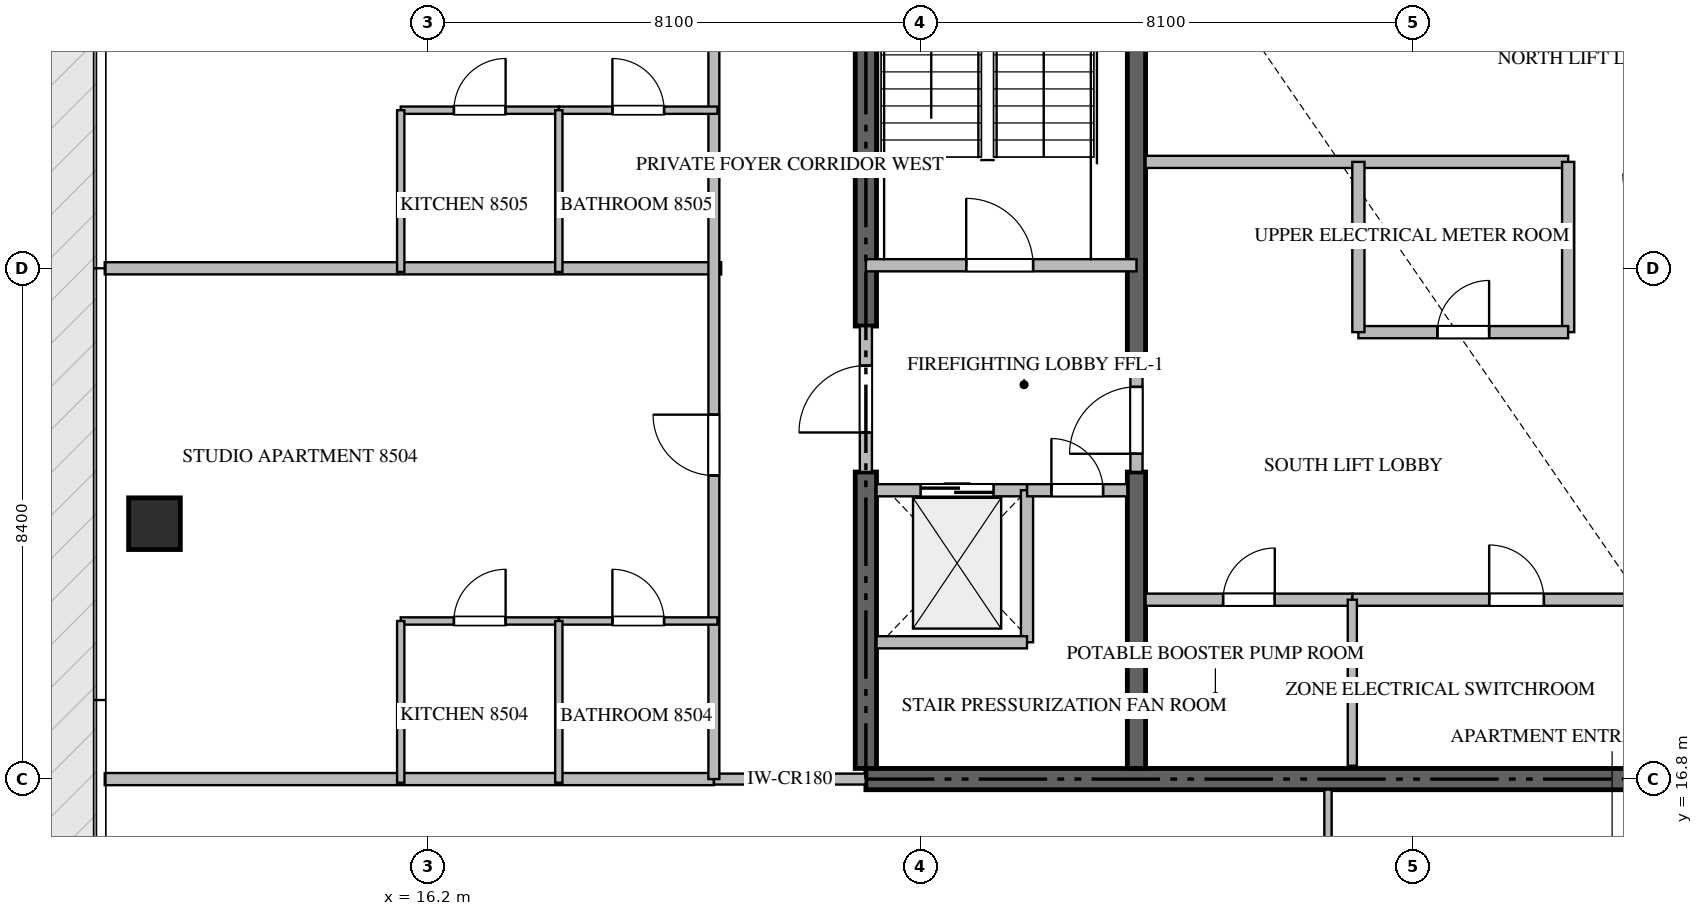
"""IFC4 building model, lengths in metres.
Left out: names, types, materials, properties, quantities, classifications, styles, units other than length and angle.
Written with IfcOpenShell. Run it as: python <this file> out.ifc"""

import sys

from ifc_helpers import new_model, si_unit, direction, frame, frame_2d, origin, origin_2d, place, context, subcontext, project, spatial, rectangle, extrude, source, transform, mapped, element, fill, save


model = new_model("IFC4")
c1 = context("Model", 3, precision=1e-05, world=origin(), true_north=direction((0.0, 1.0)))
c2 = subcontext(c1, "Body", "Model", "MODEL_VIEW")
j1 = project(units=[si_unit("LENGTHUNIT", "METRE"), si_unit("PLANEANGLEUNIT", "RADIAN")], contexts=[c1])
p1 = place(None, origin())
s1 = spatial("IfcSite", under=j1, at=p1, CompositionType="ELEMENT")
p2 = place(p1, origin())
s2 = spatial("IfcBuilding", under=s1, at=p2, CompositionType="ELEMENT")
p3 = place(p2, frame((0.0, 0.0, 342.05)))
s3 = spatial("IfcBuildingStorey", under=s2, at=p3, CompositionType="ELEMENT", Elevation=342.05)
p4 = place(p3, frame((23.4, 16.8, -0.26), z_axis=(0.0, 0.0, 1.0), x_axis=(1.0, 0.0, 0.0)))
e1 = element("IfcWall", 1, at=p4, inside=s3, PredefinedType="SHEAR", context=c2, shape_type="SweptSolid", body=[
    extrude(rectangle(XDim=18.0, YDim=0.35, at=frame_2d((9.0, 0.0))), origin(), (0.0, 0.0, 1.0), 5.898),
])
p5 = place(p3, frame((23.4, 16.975, -0.26), z_axis=(0.0, 0.0, 1.0), x_axis=(0.0, 1.0, 0.0)))
e2 = element("IfcWall", 2, at=p5, inside=s3, PredefinedType="SHEAR", context=c2, shape_type="SweptSolid", body=[
    extrude(rectangle(XDim=4.875, YDim=0.35, at=frame_2d((2.438, 0.0))), origin(), (0.0, 0.0, 1.0), 5.898),
])
p6 = place(p3, frame((23.4, 24.25, -0.26), z_axis=(0.0, 0.0, 1.0), x_axis=(0.0, 1.0, 0.0)))
e3 = element("IfcWall", 3, at=p6, inside=s3, PredefinedType="SHEAR", context=c2, shape_type="SweptSolid", body=[
    extrude(rectangle(XDim=9.175, YDim=0.35, at=frame_2d((4.587, 0.0))), origin(), (0.0, 0.0, 1.0), 5.898),
])
p7 = place(p3, frame((27.85, 16.975, -0.26), z_axis=(0.0, 0.0, 1.0), x_axis=(0.0, 1.0, 0.0)))
e4 = element("IfcWall", 4, at=p7, inside=s3, PredefinedType="SHEAR", context=c2, shape_type="SweptSolid", body=[
    extrude(rectangle(XDim=4.875, YDim=0.3, at=frame_2d((2.438, 0.0))), origin(), (0.0, 0.0, 1.0), 5.898),
])
p8 = place(p3, frame((27.85, 23.55, -0.26), z_axis=(0.0, 0.0, 1.0), x_axis=(0.0, 1.0, 0.0)))
e5 = element("IfcWall", 5, at=p8, inside=s3, PredefinedType="SHEAR", context=c2, shape_type="SweptSolid", body=[
    extrude(rectangle(XDim=9.875, YDim=0.3, at=frame_2d((4.938, 0.0))), origin(), (0.0, 0.0, 1.0), 5.898),
])
m1 = source(origin(), c2, "Body", "SweptSolid", [
    extrude(rectangle(XDim=0.85, YDim=0.85, at=origin_2d()), origin(), (0.0, 0.0, 1.0), 5.9),
])
p9 = place(p3, frame((11.7, 21.0, -0.26), z_axis=(0.0, 0.0, 1.0), x_axis=(1.0, 0.0, 0.0)))
e6 = element("IfcColumn", 6, at=p9, inside=s3, PredefinedType="COLUMN", context=c2, shape_type="MappedRepresentation", body=[
    mapped(m1, transform((0.0, 0.0, 0.0), scale=1.0)),
])
p10 = place(p3, frame((23.4, 25.25, 0.0), z_axis=(0.0, 0.0, 1.0), x_axis=(1.0, 0.0, 0.0)))
e7 = element("IfcWall", 7, at=p10, inside=s3, PredefinedType="STANDARD", context=c2, shape_type="SweptSolid", body=[
    extrude(rectangle(XDim=4.45, YDim=0.2, at=frame_2d((2.225, 0.0))), origin(), (0.0, 0.0, 1.0), 5.64),
])
p11 = place(p10, frame((1.65, 0.0, 0.0)))
e8 = element("IfcOpeningElement", 8, at=p11, cuts=e7, PredefinedType="OPENING", context=c2, shape_type="SweptSolid", body=[
    extrude(rectangle(XDim=1.1, YDim=2.15, at=frame_2d((0.55, 1.075))), frame((0.0, 0.11, 0.0), z_axis=(0.0, -1.0, 0.0), x_axis=(1.0, 0.0, 0.0)), (0.0, 0.0, 1.0), 0.22),
])
p12 = place(p3, frame((23.575, 21.55, 0.0), z_axis=(0.0, 0.0, 1.0), x_axis=(1.0, 0.0, 0.0)))
e9 = element("IfcWall", 9, at=p12, inside=s3, PredefinedType="STANDARD", context=c2, shape_type="SweptSolid", body=[
    extrude(rectangle(XDim=2.475, YDim=0.2, at=frame_2d((1.238, 0.0))), origin(), (0.0, 0.0, 1.0), 5.64),
])
p13 = place(p12, frame((0.725, 0.0, 0.0)))
e10 = element("IfcOpeningElement", 10, at=p13, cuts=e9, PredefinedType="OPENING", context=c2, shape_type="SweptSolid", body=[
    extrude(rectangle(XDim=1.2, YDim=2.2, at=frame_2d((0.6, 1.1))), frame((0.0, 0.11, 0.0), z_axis=(0.0, -1.0, 0.0), x_axis=(1.0, 0.0, 0.0)), (0.0, 0.0, 1.0), 0.22),
])
p14 = place(p3, frame((26.05, 19.05, 0.0), z_axis=(0.0, 0.0, 1.0), x_axis=(0.0, 1.0, 0.0)))
e11 = element("IfcWall", 11, at=p14, inside=s3, PredefinedType="STANDARD", context=c2, shape_type="SweptSolid", body=[
    extrude(rectangle(XDim=2.5, YDim=0.2, at=frame_2d((1.25, 0.0))), origin(), (0.0, 0.0, 1.0), 5.64),
])
p15 = place(p3, frame((23.575, 19.05, 0.0), z_axis=(0.0, 0.0, 1.0), x_axis=(1.0, 0.0, 0.0)))
e12 = element("IfcWall", 12, at=p15, inside=s3, PredefinedType="STANDARD", context=c2, shape_type="SweptSolid", body=[
    extrude(rectangle(XDim=2.475, YDim=0.2, at=frame_2d((1.238, 0.0))), origin(), (0.0, 0.0, 1.0), 5.64),
])
p16 = place(p3, frame((26.052, 21.55, 0.0), z_axis=(0.0, 0.0, 1.0), x_axis=(1.0, 0.0, 0.0)))
e13 = element("IfcWall", 13, at=p16, inside=s3, PredefinedType="STANDARD", context=c2, shape_type="SweptSolid", body=[
    extrude(rectangle(XDim=1.648, YDim=0.2, at=frame_2d((0.824, 0.0))), origin(), (0.0, 0.0, 1.0), 5.64),
])
p17 = place(p16, frame((0.399, 0.0, 0.0)))
e14 = element("IfcOpeningElement", 14, at=p17, cuts=e13, PredefinedType="OPENING", context=c2, shape_type="SweptSolid", body=[
    extrude(rectangle(XDim=0.85, YDim=2.1, at=frame_2d((0.425, 1.05))), frame((0.0, 0.11, 0.0), z_axis=(0.0, -1.0, 0.0), x_axis=(1.0, 0.0, 0.0)), (0.0, 0.0, 1.0), 0.22),
])
p18 = place(p3, frame((23.4, 21.852, 0.0), z_axis=(0.0, 0.0, 1.0), x_axis=(0.0, 1.0, 0.0)))
e15 = element("IfcWall", 15, at=p18, inside=s3, PredefinedType="STANDARD", context=c2, shape_type="SweptSolid", body=[
    extrude(rectangle(XDim=2.396, YDim=0.2, at=frame_2d((1.198, 0.0))), origin(), (0.0, 0.0, 1.0), 5.64),
])
p19 = place(p18, frame((0.648, 0.0, 0.0)))
e16 = element("IfcOpeningElement", 16, at=p19, cuts=e15, PredefinedType="OPENING", context=c2, shape_type="SweptSolid", body=[
    extrude(rectangle(XDim=1.1, YDim=2.15, at=frame_2d((0.55, 1.075))), frame((0.0, 0.11, 0.0), z_axis=(0.0, -1.0, 0.0), x_axis=(1.0, 0.0, 0.0)), (0.0, 0.0, 1.0), 0.22),
])
p20 = place(p3, frame((27.85, 21.852, 0.0), z_axis=(0.0, 0.0, 1.0), x_axis=(0.0, 1.0, 0.0)))
e17 = element("IfcWall", 17, at=p20, inside=s3, PredefinedType="STANDARD", context=c2, shape_type="SweptSolid", body=[
    extrude(rectangle(XDim=1.696, YDim=0.2, at=frame_2d((0.848, 0.0))), origin(), (0.0, 0.0, 1.0), 5.64),
])
p21 = place(p20, frame((0.298, 0.0, 0.0)))
e18 = element("IfcOpeningElement", 18, at=p21, cuts=e17, PredefinedType="OPENING", context=c2, shape_type="SweptSolid", body=[
    extrude(rectangle(XDim=1.1, YDim=2.15, at=frame_2d((0.55, 1.075))), frame((0.0, 0.11, 0.0), z_axis=(0.0, -1.0, 0.0), x_axis=(1.0, 0.0, 0.0)), (0.0, 0.0, 1.0), 0.22),
])
p22 = place(p3, frame((28.0, 19.75, 0.0), z_axis=(0.0, 0.0, 1.0), x_axis=(1.0, 0.0, 0.0)))
e19 = element("IfcWall", 19, at=p22, inside=s3, PredefinedType="STANDARD", context=c2, shape_type="SweptSolid", body=[
    extrude(rectangle(XDim=3.4, YDim=0.2, at=frame_2d((1.7, 0.0))), origin(), (0.0, 0.0, 1.0), 5.64),
])
p23 = place(p22, frame((1.275, 0.0, 0.0)))
e20 = element("IfcOpeningElement", 20, at=p23, cuts=e19, PredefinedType="OPENING", context=c2, shape_type="SweptSolid", body=[
    extrude(rectangle(XDim=0.85, YDim=2.1, at=frame_2d((0.425, 1.05))), frame((0.0, 0.11, 0.0), z_axis=(0.0, -1.0, 0.0), x_axis=(1.0, 0.0, 0.0)), (0.0, 0.0, 1.0), 0.22),
])
p24 = place(p3, frame((31.402, 19.75, 0.0), z_axis=(0.0, 0.0, 1.0), x_axis=(1.0, 0.0, 0.0)))
e21 = element("IfcWall", 21, at=p24, inside=s3, PredefinedType="STANDARD", context=c2, shape_type="SweptSolid", body=[
    extrude(rectangle(XDim=5.398, YDim=0.2, at=frame_2d((2.699, 0.0))), origin(), (0.0, 0.0, 1.0), 5.64),
])
p25 = place(p24, frame((2.249, 0.0, 0.0)))
e22 = element("IfcOpeningElement", 22, at=p25, cuts=e21, PredefinedType="OPENING", context=c2, shape_type="SweptSolid", body=[
    extrude(rectangle(XDim=0.9, YDim=2.1, at=frame_2d((0.45, 1.05))), frame((0.0, 0.11, 0.0), z_axis=(0.0, -1.0, 0.0), x_axis=(1.0, 0.0, 0.0)), (0.0, 0.0, 1.0), 0.22),
])
p26 = place(p3, frame((31.4, 17.02, 0.0), z_axis=(0.0, 0.0, 1.0), x_axis=(0.0, 1.0, 0.0)))
e23 = element("IfcWall", 23, at=p26, inside=s3, PredefinedType="PARTITIONING", context=c2, shape_type="SweptSolid", body=[
    extrude(rectangle(XDim=2.73, YDim=0.15, at=frame_2d((1.365, 0.0))), origin(), (0.0, 0.0, 1.0), 5.64),
])
p27 = place(p3, frame((28.0, 26.95, 0.0), z_axis=(0.0, 0.0, 1.0), x_axis=(1.0, 0.0, 0.0)))
e24 = element("IfcWall", 24, at=p27, inside=s3, PredefinedType="STANDARD", context=c2, shape_type="SweptSolid", body=[
    extrude(rectangle(XDim=6.95, YDim=0.2, at=frame_2d((3.475, 0.0))), origin(), (0.0, 0.0, 1.0), 5.64),
])
p28 = place(p3, frame((34.95, 24.15, 0.0), z_axis=(0.0, 0.0, 1.0), x_axis=(0.0, 1.0, 0.0)))
e25 = element("IfcWall", 25, at=p28, inside=s3, PredefinedType="STANDARD", context=c2, shape_type="SweptSolid", body=[
    extrude(rectangle(XDim=2.8, YDim=0.2, at=frame_2d((1.4, 0.0))), origin(), (0.0, 0.0, 1.0), 5.64),
])
p29 = place(p3, frame((31.5, 24.15, 0.0), z_axis=(0.0, 0.0, 1.0), x_axis=(1.0, 0.0, 0.0)))
e26 = element("IfcWall", 26, at=p29, inside=s3, PredefinedType="STANDARD", context=c2, shape_type="SweptSolid", body=[
    extrude(rectangle(XDim=3.45, YDim=0.2, at=frame_2d((1.725, 0.0))), origin(), (0.0, 0.0, 1.0), 5.64),
])
p30 = place(p29, frame((1.3, 0.0, 0.0)))
e27 = element("IfcOpeningElement", 27, at=p30, cuts=e26, PredefinedType="OPENING", context=c2, shape_type="SweptSolid", body=[
    extrude(rectangle(XDim=0.85, YDim=2.1, at=frame_2d((0.425, 1.05))), frame((0.0, 0.11, 0.0), z_axis=(0.0, -1.0, 0.0), x_axis=(1.0, 0.0, 0.0)), (0.0, 0.0, 1.0), 0.22),
])
p31 = place(p3, frame((31.5, 24.15, 0.0), z_axis=(0.0, 0.0, 1.0), x_axis=(0.0, 1.0, 0.0)))
e28 = element("IfcWall", 28, at=p31, inside=s3, PredefinedType="STANDARD", context=c2, shape_type="SweptSolid", body=[
    extrude(rectangle(XDim=2.8, YDim=0.2, at=frame_2d((1.4, 0.0))), origin(), (0.0, 0.0, 1.0), 5.64),
])
p32 = place(p3, frame((10.882, 25.2, 0.0), z_axis=(0.0, 0.0, 1.0), x_axis=(1.0, 0.0, 0.0)))
e29 = element("IfcWall", 29, at=p32, inside=s3, PredefinedType="PARTITIONING", context=c2, shape_type="SweptSolid", body=[
    extrude(rectangle(XDim=10.138, YDim=0.2, at=frame_2d((5.069, 0.0))), origin(), (0.0, 0.0, 1.0), 5.64),
])
p33 = place(p3, frame((10.882, 16.8, 0.0), z_axis=(0.0, 0.0, 1.0), x_axis=(1.0, 0.0, 0.0)))
e30 = element("IfcWall", 30, at=p33, inside=s3, PredefinedType="PARTITIONING", context=c2, shape_type="SweptSolid", body=[
    extrude(rectangle(XDim=10.018, YDim=0.2, at=frame_2d((5.009, 0.0))), origin(), (0.0, 0.0, 1.0), 5.64),
])
p34 = place(p3, frame((20.902, 16.8, 0.0), z_axis=(0.0, 0.0, 1.0), x_axis=(1.0, 0.0, 0.0)))
e31 = element("IfcWall", 31, at=p34, inside=s3, PredefinedType="PARTITIONING", context=c2, shape_type="SweptSolid", body=[
    extrude(rectangle(XDim=2.496, YDim=0.18, at=frame_2d((1.248, 0.0))), origin(), (0.0, 0.0, 1.0), 5.64),
])
p35 = place(p3, frame((20.9, 16.8, 0.0), z_axis=(0.0, 0.0, 1.0), x_axis=(0.0, 1.0, 0.0)))
e32 = element("IfcWall", 32, at=p35, inside=s3, PredefinedType="PARTITIONING", context=c2, shape_type="SweptSolid", body=[
    extrude(rectangle(XDim=16.8, YDim=0.18, at=frame_2d((8.4, 0.0))), origin(), (0.0, 0.0, 1.0), 5.64),
])
p36 = place(p35, frame((4.993, 0.0, 0.0)))
e33 = element("IfcOpeningElement", 33, at=p36, cuts=e32, PredefinedType="OPENING", context=c2, shape_type="SweptSolid", body=[
    extrude(rectangle(XDim=1.0, YDim=2.15, at=frame_2d((0.5, 1.075))), frame((0.0, 0.1, 0.0), z_axis=(0.0, -1.0, 0.0), x_axis=(1.0, 0.0, 0.0)), (0.0, 0.0, 1.0), 0.2),
])
p37 = place(p35, frame((13.351, 0.0, 0.0)))
e34 = element("IfcOpeningElement", 34, at=p37, cuts=e32, PredefinedType="OPENING", context=c2, shape_type="SweptSolid", body=[
    extrude(rectangle(XDim=1.0, YDim=2.15, at=frame_2d((0.5, 1.075))), frame((0.0, 0.1, 0.0), z_axis=(0.0, -1.0, 0.0), x_axis=(1.0, 0.0, 0.0)), (0.0, 0.0, 1.0), 0.2),
])
p38 = place(p3, frame((31.0, 14.652, 0.0), z_axis=(0.0, 0.0, 1.0), x_axis=(0.0, 1.0, 0.0)))
e35 = element("IfcWall", 35, at=p38, inside=s3, PredefinedType="PARTITIONING", context=c2, shape_type="SweptSolid", body=[
    extrude(rectangle(XDim=1.973, YDim=0.12, at=frame_2d((0.986, 0.0))), origin(), (0.0, 0.0, 1.0), 5.64),
])
p39 = place(p3, frame((15.75, 19.4, 0.0), z_axis=(0.0, 0.0, 1.0), x_axis=(1.0, 0.0, 0.0)))
e36 = element("IfcWall", 36, at=p39, inside=s3, PredefinedType="PARTITIONING", context=c2, shape_type="SweptSolid", body=[
    extrude(rectangle(XDim=2.6, YDim=0.12, at=frame_2d((1.3, 0.0))), origin(), (0.0, 0.0, 1.0), 5.64),
])
p40 = place(p39, frame((0.875, 0.0, 0.0)))
e37 = element("IfcOpeningElement", 37, at=p40, cuts=e36, PredefinedType="OPENING", context=c2, shape_type="SweptSolid", body=[
    extrude(rectangle(XDim=0.85, YDim=2.1, at=frame_2d((0.425, 1.05))), frame((0.0, 0.07, 0.0), z_axis=(0.0, -1.0, 0.0), x_axis=(1.0, 0.0, 0.0)), (0.0, 0.0, 1.0), 0.14),
])
p41 = place(p3, frame((18.352, 19.4, 0.0), z_axis=(0.0, 0.0, 1.0), x_axis=(1.0, 0.0, 0.0)))
e38 = element("IfcWall", 38, at=p41, inside=s3, PredefinedType="PARTITIONING", context=c2, shape_type="SweptSolid", body=[
    extrude(rectangle(XDim=2.608, YDim=0.12, at=frame_2d((1.304, 0.0))), origin(), (0.0, 0.0, 1.0), 5.64),
])
p42 = place(p41, frame((0.879, 0.0, 0.0)))
e39 = element("IfcOpeningElement", 39, at=p42, cuts=e38, PredefinedType="OPENING", context=c2, shape_type="SweptSolid", body=[
    extrude(rectangle(XDim=0.85, YDim=2.1, at=frame_2d((0.425, 1.05))), frame((0.0, 0.07, 0.0), z_axis=(0.0, -1.0, 0.0), x_axis=(1.0, 0.0, 0.0)), (0.0, 0.0, 1.0), 0.14),
])
for number, where, z_axis, x_axis in (
    (40, (18.35, 16.74, 0.0), (0.0, 0.0, 1.0), (0.0, 1.0, 0.0)),
    (41, (15.75, 16.74, 0.0), (0.0, 0.0, 1.0), (0.0, 1.0, 0.0)),
):
    element("IfcWall", number, at=place(p3, frame(where, z_axis=z_axis, x_axis=x_axis)), inside=s3, PredefinedType="PARTITIONING", context=c2, shape_type="SweptSolid", body=[
        extrude(rectangle(XDim=2.66, YDim=0.12, at=frame_2d((1.33, 0.0))), origin(), (0.0, 0.0, 1.0), 5.64),
    ])
p43 = place(p3, frame((15.75, 27.8, 0.0), z_axis=(0.0, 0.0, 1.0), x_axis=(1.0, 0.0, 0.0)))
e42 = element("IfcWall", 42, at=p43, inside=s3, PredefinedType="PARTITIONING", context=c2, shape_type="SweptSolid", body=[
    extrude(rectangle(XDim=2.6, YDim=0.12, at=frame_2d((1.3, 0.0))), origin(), (0.0, 0.0, 1.0), 5.64),
])
p44 = place(p43, frame((0.875, 0.0, 0.0)))
e43 = element("IfcOpeningElement", 43, at=p44, cuts=e42, PredefinedType="OPENING", context=c2, shape_type="SweptSolid", body=[
    extrude(rectangle(XDim=0.85, YDim=2.1, at=frame_2d((0.425, 1.05))), frame((0.0, 0.07, 0.0), z_axis=(0.0, -1.0, 0.0), x_axis=(1.0, 0.0, 0.0)), (0.0, 0.0, 1.0), 0.14),
])
p45 = place(p3, frame((18.352, 27.8, 0.0), z_axis=(0.0, 0.0, 1.0), x_axis=(1.0, 0.0, 0.0)))
e44 = element("IfcWall", 44, at=p45, inside=s3, PredefinedType="PARTITIONING", context=c2, shape_type="SweptSolid", body=[
    extrude(rectangle(XDim=2.608, YDim=0.12, at=frame_2d((1.304, 0.0))), origin(), (0.0, 0.0, 1.0), 5.64),
])
p46 = place(p45, frame((0.879, 0.0, 0.0)))
e45 = element("IfcOpeningElement", 45, at=p46, cuts=e44, PredefinedType="OPENING", context=c2, shape_type="SweptSolid", body=[
    extrude(rectangle(XDim=0.85, YDim=2.1, at=frame_2d((0.425, 1.05))), frame((0.0, 0.07, 0.0), z_axis=(0.0, -1.0, 0.0), x_axis=(1.0, 0.0, 0.0)), (0.0, 0.0, 1.0), 0.14),
])
for number, where, z_axis, x_axis in (
    (46, (18.35, 25.14, 0.0), (0.0, 0.0, 1.0), (0.0, 1.0, 0.0)),
    (47, (15.75, 25.14, 0.0), (0.0, 0.0, 1.0), (0.0, 1.0, 0.0)),
):
    element("IfcWall", number, at=place(p3, frame(where, z_axis=z_axis, x_axis=x_axis)), inside=s3, PredefinedType="PARTITIONING", context=c2, shape_type="SweptSolid", body=[
        extrude(rectangle(XDim=2.66, YDim=0.12, at=frame_2d((1.33, 0.0))), origin(), (0.0, 0.0, 1.0), 5.64),
    ])
m2 = source(origin(), c2, "Body", "SweptSolid", [
    extrude(rectangle(XDim=1.1, YDim=2.15, at=frame_2d((0.55, 1.075))), frame((0.0, 0.025, 0.0), z_axis=(0.0, -1.0, 0.0), x_axis=(1.0, 0.0, 0.0)), (0.0, 0.0, 1.0), 0.05),
])
p47 = place(p11, origin())
e48 = element("IfcDoor", 48, at=p47, inside=s3, OperationType="SINGLE_SWING_LEFT", PredefinedType="DOOR", context=c2, shape_type="MappedRepresentation", body=[
    mapped(m2, transform((0.0, 0.0, 0.0), scale=1.0)),
])
fill(e8, e48)
m3 = source(origin(), c2, "Body", "SweptSolid", [
    extrude(rectangle(XDim=1.2, YDim=2.2, at=frame_2d((0.6, 1.1))), frame((0.0, 0.025, 0.0), z_axis=(0.0, -1.0, 0.0), x_axis=(1.0, 0.0, 0.0)), (0.0, 0.0, 1.0), 0.05),
])
p48 = place(p13, origin())
e49 = element("IfcDoor", 49, at=p48, inside=s3, OperationType="DOUBLE_DOOR_SLIDING", PredefinedType="DOOR", context=c2, shape_type="MappedRepresentation", body=[
    mapped(m3, transform((0.0, 0.0, 0.0), scale=1.0)),
])
fill(e10, e49)
m4 = source(origin(), c2, "Body", "SweptSolid", [
    extrude(rectangle(XDim=0.85, YDim=2.1, at=frame_2d((0.425, 1.05))), frame((0.0, 0.025, 0.0), z_axis=(0.0, -1.0, 0.0), x_axis=(1.0, 0.0, 0.0)), (0.0, 0.0, 1.0), 0.05),
])
p49 = place(p17, origin())
e50 = element("IfcDoor", 50, at=p49, inside=s3, OperationType="SINGLE_SWING_LEFT", PredefinedType="DOOR", context=c2, shape_type="MappedRepresentation", body=[
    mapped(m4, transform((0.0, 0.0, 0.0), scale=1.0)),
])
fill(e14, e50)
p50 = place(p19, origin())
e51 = element("IfcDoor", 51, at=p50, inside=s3, OperationType="SINGLE_SWING_LEFT", PredefinedType="DOOR", context=c2, shape_type="MappedRepresentation", body=[
    mapped(m2, transform((0.0, 0.0, 0.0), scale=1.0)),
])
fill(e16, e51)
p51 = place(p21, origin())
e52 = element("IfcDoor", 52, at=p51, inside=s3, OperationType="SINGLE_SWING_LEFT", PredefinedType="DOOR", context=c2, shape_type="MappedRepresentation", body=[
    mapped(m2, transform((0.0, 0.0, 0.0), scale=1.0)),
])
fill(e18, e52)
p52 = place(p23, origin())
e53 = element("IfcDoor", 53, at=p52, inside=s3, OperationType="SINGLE_SWING_RIGHT", PredefinedType="DOOR", context=c2, shape_type="MappedRepresentation", body=[
    mapped(m4, transform((0.0, 0.0, 0.0), scale=1.0)),
])
fill(e20, e53)
m5 = source(origin(), c2, "Body", "SweptSolid", [
    extrude(rectangle(XDim=0.9, YDim=2.1, at=frame_2d((0.45, 1.05))), frame((0.0, 0.025, 0.0), z_axis=(0.0, -1.0, 0.0), x_axis=(1.0, 0.0, 0.0)), (0.0, 0.0, 1.0), 0.05),
])
p53 = place(p25, origin())
e54 = element("IfcDoor", 54, at=p53, inside=s3, OperationType="SINGLE_SWING_LEFT", PredefinedType="DOOR", context=c2, shape_type="MappedRepresentation", body=[
    mapped(m5, transform((0.0, 0.0, 0.0), scale=1.0)),
])
fill(e22, e54)
p54 = place(p30, origin())
e55 = element("IfcDoor", 55, at=p54, inside=s3, OperationType="SINGLE_SWING_RIGHT", PredefinedType="DOOR", context=c2, shape_type="MappedRepresentation", body=[
    mapped(m4, transform((0.0, 0.0, 0.0), scale=1.0)),
])
fill(e27, e55)
m6 = source(origin(), c2, "Body", "SweptSolid", [
    extrude(rectangle(XDim=1.0, YDim=2.15, at=frame_2d((0.5, 1.075))), frame((0.0, 0.025, 0.0), z_axis=(0.0, -1.0, 0.0), x_axis=(1.0, 0.0, 0.0)), (0.0, 0.0, 1.0), 0.05),
])
p55 = place(p36, origin())
e56 = element("IfcDoor", 56, at=p55, inside=s3, OperationType="SINGLE_SWING_RIGHT", PredefinedType="DOOR", context=c2, shape_type="MappedRepresentation", body=[
    mapped(m6, transform((0.0, 0.0, 0.0), scale=1.0)),
])
fill(e33, e56)
p56 = place(p40, origin())
e57 = element("IfcDoor", 57, at=p56, inside=s3, OperationType="SINGLE_SWING_RIGHT", PredefinedType="DOOR", context=c2, shape_type="MappedRepresentation", body=[
    mapped(m4, transform((0.0, 0.0, 0.0), scale=1.0)),
])
fill(e37, e57)
p57 = place(p42, origin())
e58 = element("IfcDoor", 58, at=p57, inside=s3, OperationType="SINGLE_SWING_LEFT", PredefinedType="DOOR", context=c2, shape_type="MappedRepresentation", body=[
    mapped(m4, transform((0.0, 0.0, 0.0), scale=1.0)),
])
fill(e39, e58)
p58 = place(p44, origin())
e59 = element("IfcDoor", 59, at=p58, inside=s3, OperationType="SINGLE_SWING_RIGHT", PredefinedType="DOOR", context=c2, shape_type="MappedRepresentation", body=[
    mapped(m4, transform((0.0, 0.0, 0.0), scale=1.0)),
])
fill(e43, e59)
p59 = place(p46, origin())
e60 = element("IfcDoor", 60, at=p59, inside=s3, OperationType="SINGLE_SWING_LEFT", PredefinedType="DOOR", context=c2, shape_type="MappedRepresentation", body=[
    mapped(m4, transform((0.0, 0.0, 0.0), scale=1.0)),
])
fill(e45, e60)
save(model, sys.argv[1])
